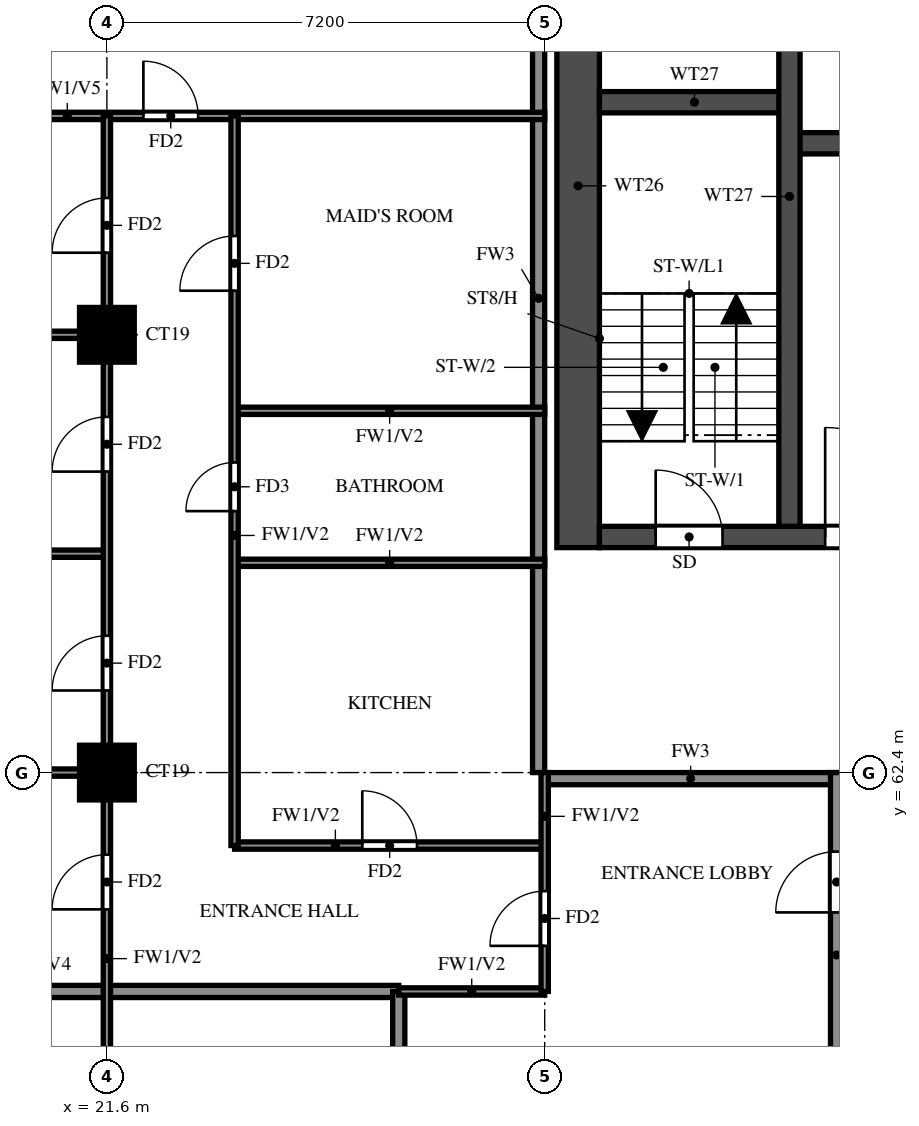
"""IFC4 building model, lengths in metres.
Left out: names, types, materials, properties, quantities, classifications, styles, units other than length and angle.
Written with IfcOpenShell. Run it as: python <this file> out.ifc"""

import sys

from ifc_helpers import new_model, si_unit, direction, frame, frame_2d, origin, origin_2d, place, context, subcontext, project, spatial, rectangle, extrude, source, transform, mapped, element, fill, save


model = new_model("IFC4")
c1 = context("Model", 3, precision=1e-05, world=origin(), true_north=direction((0.0, 1.0)))
c2 = subcontext(c1, "Body", "Model", "MODEL_VIEW")
j1 = project(units=[si_unit("LENGTHUNIT", "METRE"), si_unit("PLANEANGLEUNIT", "RADIAN")], contexts=[c1])
p1 = place(None, origin())
s1 = spatial("IfcSite", under=j1, at=p1, CompositionType="ELEMENT")
p2 = place(p1, origin())
s2 = spatial("IfcBuilding", under=s1, at=p2, CompositionType="ELEMENT")
p3 = place(p2, frame((0.0, 0.0, 188.5)))
s3 = spatial("IfcBuildingStorey", under=s2, at=p3, CompositionType="ELEMENT", Elevation=188.5)
m1 = source(origin(), c2, "Body", "SweptSolid", [
    extrude(rectangle(XDim=0.9, YDim=0.9, at=origin_2d()), origin(), (0.0, 0.0, 1.0), 3.2),
])
for number, where, z_axis, x_axis in (
    (1, (21.6, 62.4, 0.0), (0.0, 0.0, 1.0), (1.0, 0.0, 0.0)),
    (2, (21.6, 69.6, 0.0), (0.0, 0.0, 1.0), (1.0, 0.0, 0.0)),
):
    element("IfcColumn", number, at=place(p3, frame(where, z_axis=z_axis, x_axis=x_axis)), inside=s3, PredefinedType="COLUMN", context=c2, shape_type="MappedRepresentation", body=[
        mapped(m1, transform((0.0, 0.0, 0.0))),
    ])
p4 = place(p3, frame((29.35, 66.1, 0.0), z_axis=(0.0, 0.0, 1.0), x_axis=(0.0, 1.0, 0.0)))
e3 = element("IfcWall", 3, at=p4, inside=s3, PredefinedType="SHEAR", context=c2, shape_type="SweptSolid", body=[
    extrude(rectangle(XDim=11.9, YDim=0.7, at=frame_2d((5.95, 0.0))), origin(), (0.0, 0.0, 1.0), 3.2),
])
p5 = place(p3, frame((29.7, 66.275, 0.0), z_axis=(0.0, 0.0, 1.0), x_axis=(1.0, 0.0, 0.0)))
e4 = element("IfcWall", 4, at=p5, inside=s3, PredefinedType="SHEAR", context=c2, shape_type="SweptSolid", body=[
    extrude(rectangle(XDim=41.4, YDim=0.35, at=frame_2d((20.7, 0.0))), origin(), (0.0, 0.0, 1.0), 3.2),
])
p6 = place(p5, frame((0.925, 0.0, 0.0)))
e5 = element("IfcOpeningElement", 5, at=p6, cuts=e4, PredefinedType="OPENING", context=c2, shape_type="SweptSolid", body=[
    extrude(rectangle(XDim=1.1, YDim=2.1, at=frame_2d((0.55, 1.05))), frame((0.0, 0.185, 0.0), z_axis=(0.0, -1.0, 0.0), x_axis=(1.0, 0.0, 0.0)), (0.0, 0.0, 1.0), 0.37),
])
p7 = place(p5, frame((3.712, 0.0, 0.0)))
e6 = element("IfcOpeningElement", 6, at=p7, cuts=e4, PredefinedType="OPENING", context=c2, shape_type="SweptSolid", body=[
    extrude(rectangle(XDim=1.8, YDim=2.1, at=frame_2d((0.9, 1.05))), frame((0.0, 0.185, 0.0), z_axis=(0.0, -1.0, 0.0), x_axis=(1.0, 0.0, 0.0)), (0.0, 0.0, 1.0), 0.37),
])
p8 = place(p3, frame((32.825, 72.75, 0.0), z_axis=(0.0, 0.0, 1.0), x_axis=(1.0, 0.0, 0.0)))
e7 = element("IfcWall", 7, at=p8, inside=s3, PredefinedType="SHEAR", context=c2, shape_type="SweptSolid", body=[
    extrude(rectangle(XDim=35.15, YDim=0.35, at=frame_2d((17.575, 0.0))), origin(), (0.0, 0.0, 1.0), 3.2),
])
p9 = place(p8, frame((19.8, 0.0, 0.0)))
e8 = element("IfcOpeningElement", 8, at=p9, cuts=e7, PredefinedType="OPENING", context=c2, shape_type="SweptSolid", body=[
    extrude(rectangle(XDim=1.1, YDim=2.1, at=frame_2d((0.55, 1.05))), frame((0.0, 0.185, 0.0), z_axis=(0.0, -1.0, 0.0), x_axis=(1.0, 0.0, 0.0)), (0.0, 0.0, 1.0), 0.37),
])
p10 = place(p8, frame((27.7, 0.0, 0.0)))
e9 = element("IfcOpeningElement", 9, at=p10, cuts=e7, PredefinedType="OPENING", context=c2, shape_type="SweptSolid", body=[
    extrude(rectangle(XDim=1.1, YDim=2.1, at=frame_2d((0.55, 1.05))), frame((0.0, 0.185, 0.0), z_axis=(0.0, -1.0, 0.0), x_axis=(1.0, 0.0, 0.0)), (0.0, 0.0, 1.0), 0.37),
])
p11 = place(p8, frame((30.3, 0.0, 0.0)))
e10 = element("IfcOpeningElement", 10, at=p11, cuts=e7, PredefinedType="OPENING", context=c2, shape_type="SweptSolid", body=[
    extrude(rectangle(XDim=1.1, YDim=2.1, at=frame_2d((0.55, 1.05))), frame((0.0, 0.185, 0.0), z_axis=(0.0, -1.0, 0.0), x_axis=(1.0, 0.0, 0.0)), (0.0, 0.0, 1.0), 0.37),
])
p12 = place(p8, frame((3.8, 0.0, 0.0)))
e11 = element("IfcOpeningElement", 11, at=p12, cuts=e7, PredefinedType="OPENING", context=c2, shape_type="SweptSolid", body=[
    extrude(rectangle(XDim=1.1, YDim=2.1, at=frame_2d((0.55, 1.05))), frame((0.0, 0.185, 0.0), z_axis=(0.0, -1.0, 0.0), x_axis=(1.0, 0.0, 0.0)), (0.0, 0.0, 1.0), 0.37),
])
p13 = place(p8, frame((6.55, 0.0, 0.0)))
e12 = element("IfcOpeningElement", 12, at=p13, cuts=e7, PredefinedType="OPENING", context=c2, shape_type="SweptSolid", body=[
    extrude(rectangle(XDim=1.1, YDim=2.1, at=frame_2d((0.55, 1.05))), frame((0.0, 0.185, 0.0), z_axis=(0.0, -1.0, 0.0), x_axis=(1.0, 0.0, 0.0)), (0.0, 0.0, 1.0), 0.37),
])
p14 = place(p8, frame((9.3, 0.0, 0.0)))
e13 = element("IfcOpeningElement", 13, at=p14, cuts=e7, PredefinedType="OPENING", context=c2, shape_type="SweptSolid", body=[
    extrude(rectangle(XDim=1.1, YDim=2.1, at=frame_2d((0.55, 1.05))), frame((0.0, 0.185, 0.0), z_axis=(0.0, -1.0, 0.0), x_axis=(1.0, 0.0, 0.0)), (0.0, 0.0, 1.0), 0.37),
])
p15 = place(p8, frame((12.05, 0.0, 0.0)))
e14 = element("IfcOpeningElement", 14, at=p15, cuts=e7, PredefinedType="OPENING", context=c2, shape_type="SweptSolid", body=[
    extrude(rectangle(XDim=1.1, YDim=2.1, at=frame_2d((0.55, 1.05))), frame((0.0, 0.185, 0.0), z_axis=(0.0, -1.0, 0.0), x_axis=(1.0, 0.0, 0.0)), (0.0, 0.0, 1.0), 0.37),
])
p16 = place(p8, frame((14.8, 0.0, 0.0)))
e15 = element("IfcOpeningElement", 15, at=p16, cuts=e7, PredefinedType="OPENING", context=c2, shape_type="SweptSolid", body=[
    extrude(rectangle(XDim=1.1, YDim=2.1, at=frame_2d((0.55, 1.05))), frame((0.0, 0.185, 0.0), z_axis=(0.0, -1.0, 0.0), x_axis=(1.0, 0.0, 0.0)), (0.0, 0.0, 1.0), 0.37),
])
p17 = place(p8, frame((17.55, 0.0, 0.0)))
e16 = element("IfcOpeningElement", 16, at=p17, cuts=e7, PredefinedType="OPENING", context=c2, shape_type="SweptSolid", body=[
    extrude(rectangle(XDim=1.1, YDim=2.1, at=frame_2d((0.55, 1.05))), frame((0.0, 0.185, 0.0), z_axis=(0.0, -1.0, 0.0), x_axis=(1.0, 0.0, 0.0)), (0.0, 0.0, 1.0), 0.37),
])
p18 = place(p8, frame((0.938, 0.0, 0.0)))
e17 = element("IfcOpeningElement", 17, at=p18, cuts=e7, PredefinedType="OPENING", context=c2, shape_type="SweptSolid", body=[
    extrude(rectangle(XDim=1.1, YDim=2.1, at=frame_2d((0.55, 1.05))), frame((0.0, 0.185, 0.0), z_axis=(0.0, -1.0, 0.0), x_axis=(1.0, 0.0, 0.0)), (0.0, 0.0, 1.0), 0.37),
])
p19 = place(p3, frame((29.7, 73.425, 0.0), z_axis=(0.0, 0.0, 1.0), x_axis=(1.0, 0.0, 0.0)))
e18 = element("IfcWall", 18, at=p19, inside=s3, PredefinedType="SHEAR", context=c2, shape_type="SweptSolid", body=[
    extrude(rectangle(XDim=3.125, YDim=0.35, at=frame_2d((1.562, 0.0))), origin(), (0.0, 0.0, 1.0), 3.2),
])
p20 = place(p3, frame((32.825, 66.45, 0.0), z_axis=(0.0, 0.0, 1.0), x_axis=(0.0, 1.0, 0.0)))
e19 = element("IfcWall", 19, at=p20, inside=s3, PredefinedType="SHEAR", context=c2, shape_type="SweptSolid", body=[
    extrude(rectangle(XDim=10.85, YDim=0.35, at=frame_2d((5.425, 0.0))), origin(), (0.0, 0.0, 1.0), 3.2),
])
p21 = place(p3, frame((28.8, 62.3, 0.0), z_axis=(0.0, 0.0, 1.0), x_axis=(1.0, 0.0, 0.0)))
e20 = element("IfcWall", 20, at=p21, inside=s3, PredefinedType="SOLIDWALL", context=c2, shape_type="SweptSolid", body=[
    extrude(rectangle(XDim=4.8, YDim=0.2, at=frame_2d((2.4, 0.0))), origin(), (0.0, 0.0, 1.0), 3.2),
])
p22 = place(p3, frame((28.7, 62.4, 0.0), z_axis=(0.0, 0.0, 1.0), x_axis=(0.0, 1.0, 0.0)))
e21 = element("IfcWall", 21, at=p22, inside=s3, PredefinedType="SOLIDWALL", context=c2, shape_type="SweptSolid", body=[
    extrude(rectangle(XDim=15.6, YDim=0.2, at=frame_2d((7.8, 0.0))), origin(), (0.0, 0.0, 1.0), 3.2),
])
p23 = place(p3, frame((33.6, 56.4, 0.0), z_axis=(0.0, 0.0, 1.0), x_axis=(0.0, 1.0, 0.0)))
e22 = element("IfcWall", 22, at=p23, inside=s3, PredefinedType="SOLIDWALL", context=c2, shape_type="SweptSolid", body=[
    extrude(rectangle(XDim=6.0, YDim=0.2, at=frame_2d((3.0, 0.0))), origin(), (0.0, 0.0, 1.0), 3.2),
])
p24 = place(p23, frame((3.7, 0.0, 0.0)))
e23 = element("IfcOpeningElement", 23, at=p24, cuts=e22, PredefinedType="OPENING", context=c2, shape_type="SweptSolid", body=[
    extrude(rectangle(XDim=1.0, YDim=2.1, at=frame_2d((0.5, 1.05))), frame((0.0, 0.11, 0.0), z_axis=(0.0, -1.0, 0.0), x_axis=(1.0, 0.0, 0.0)), (0.0, 0.0, 1.0), 0.22),
])
p25 = place(p3, frame((14.525, 58.8, 0.0), z_axis=(0.0, 0.0, 1.0), x_axis=(1.0, 0.0, 0.0)))
e24 = element("IfcWall", 24, at=p25, inside=s3, PredefinedType="SOLIDWALL", context=c2, shape_type="SweptSolid", body=[
    extrude(rectangle(XDim=11.875, YDim=0.2, at=frame_2d((5.938, 0.0))), origin(), (0.0, 0.0, 1.0), 2.3),
])
p26 = place(p3, frame((26.4, 56.4, 0.0), z_axis=(0.0, 0.0, 1.0), x_axis=(0.0, 1.0, 0.0)))
e25 = element("IfcWall", 25, at=p26, inside=s3, PredefinedType="SOLIDWALL", context=c2, shape_type="SweptSolid", body=[
    extrude(rectangle(XDim=2.4, YDim=0.2, at=frame_2d((1.2, 0.0))), origin(), (0.0, 0.0, 1.0), 3.2),
])
p27 = place(p3, frame((26.4, 58.8, 0.0), z_axis=(0.0, 0.0, 1.0), x_axis=(1.0, 0.0, 0.0)))
e26 = element("IfcWall", 26, at=p27, inside=s3, PredefinedType="PARTITIONING", context=c2, shape_type="SweptSolid", body=[
    extrude(rectangle(XDim=2.4, YDim=0.12, at=frame_2d((1.2, 0.0))), origin(), (0.0, 0.0, 1.0), 3.2),
])
p28 = place(p3, frame((23.7, 61.2, 0.0), z_axis=(0.0, 0.0, 1.0), x_axis=(1.0, 0.0, 0.0)))
e27 = element("IfcWall", 27, at=p28, inside=s3, PredefinedType="PARTITIONING", context=c2, shape_type="SweptSolid", body=[
    extrude(rectangle(XDim=5.1, YDim=0.12, at=frame_2d((2.55, 0.0))), origin(), (0.0, 0.0, 1.0), 3.2),
])
p29 = place(p28, frame((2.1, 0.0, 0.0)))
e28 = element("IfcOpeningElement", 28, at=p29, cuts=e27, PredefinedType="OPENING", context=c2, shape_type="SweptSolid", body=[
    extrude(rectangle(XDim=0.9, YDim=2.1, at=frame_2d((0.45, 1.05))), frame((0.0, 0.07, 0.0), z_axis=(0.0, -1.0, 0.0), x_axis=(1.0, 0.0, 0.0)), (0.0, 0.0, 1.0), 0.14),
])
p30 = place(p3, frame((14.525, 62.4, 0.0), z_axis=(0.0, 0.0, 1.0), x_axis=(1.0, 0.0, 0.0)))
e29 = element("IfcWall", 29, at=p30, inside=s3, PredefinedType="PARTITIONING", context=c2, shape_type="SweptSolid", body=[
    extrude(rectangle(XDim=7.075, YDim=0.12, at=frame_2d((3.538, 0.0))), origin(), (0.0, 0.0, 1.0), 3.2),
])
p31 = place(p3, frame((23.7, 65.85, 0.0), z_axis=(0.0, 0.0, 1.0), x_axis=(1.0, 0.0, 0.0)))
e30 = element("IfcWall", 30, at=p31, inside=s3, PredefinedType="PARTITIONING", context=c2, shape_type="SweptSolid", body=[
    extrude(rectangle(XDim=5.1, YDim=0.12, at=frame_2d((2.55, 0.0))), origin(), (0.0, 0.0, 1.0), 3.2),
])
p32 = place(p3, frame((14.525, 66.0, 0.0), z_axis=(0.0, 0.0, 1.0), x_axis=(1.0, 0.0, 0.0)))
e31 = element("IfcWall", 31, at=p32, inside=s3, PredefinedType="PARTITIONING", context=c2, shape_type="SweptSolid", body=[
    extrude(rectangle(XDim=7.075, YDim=0.12, at=frame_2d((3.538, 0.0))), origin(), (0.0, 0.0, 1.0), 2.3),
])
p33 = place(p3, frame((23.7, 68.35, 0.0), z_axis=(0.0, 0.0, 1.0), x_axis=(1.0, 0.0, 0.0)))
e32 = element("IfcWall", 32, at=p33, inside=s3, PredefinedType="PARTITIONING", context=c2, shape_type="SweptSolid", body=[
    extrude(rectangle(XDim=5.1, YDim=0.12, at=frame_2d((2.55, 0.0))), origin(), (0.0, 0.0, 1.0), 3.2),
])
p34 = place(p3, frame((14.525, 69.6, 0.0), z_axis=(0.0, 0.0, 1.0), x_axis=(1.0, 0.0, 0.0)))
e33 = element("IfcWall", 33, at=p34, inside=s3, PredefinedType="PARTITIONING", context=c2, shape_type="SweptSolid", body=[
    extrude(rectangle(XDim=7.075, YDim=0.12, at=frame_2d((3.538, 0.0))), origin(), (0.0, 0.0, 1.0), 3.2),
])
p35 = place(p3, frame((14.525, 73.2, 0.0), z_axis=(0.0, 0.0, 1.0), x_axis=(1.0, 0.0, 0.0)))
e34 = element("IfcWall", 34, at=p35, inside=s3, PredefinedType="PARTITIONING", context=c2, shape_type="SweptSolid", body=[
    extrude(rectangle(XDim=14.275, YDim=0.12, at=frame_2d((7.138, 0.0))), origin(), (0.0, 0.0, 1.0), 2.3),
])
p36 = place(p35, frame((7.675, 0.0, 0.0)))
e35 = element("IfcOpeningElement", 35, at=p36, cuts=e34, PredefinedType="OPENING", context=c2, shape_type="SweptSolid", body=[
    extrude(rectangle(XDim=0.9, YDim=2.1, at=frame_2d((0.45, 1.05))), frame((0.0, 0.07, 0.0), z_axis=(0.0, -1.0, 0.0), x_axis=(1.0, 0.0, 0.0)), (0.0, 0.0, 1.0), 0.14),
])
p37 = place(p3, frame((21.6, 48.0, 0.0), z_axis=(0.0, 0.0, 1.0), x_axis=(0.0, 1.0, 0.0)))
e36 = element("IfcWall", 36, at=p37, inside=s3, PredefinedType="PARTITIONING", context=c2, shape_type="SweptSolid", body=[
    extrude(rectangle(XDim=25.2, YDim=0.12, at=frame_2d((12.6, 0.0))), origin(), (0.0, 0.0, 1.0), 3.2),
])
p38 = place(p37, frame((1.35, 0.0, 0.0)))
e37 = element("IfcOpeningElement", 37, at=p38, cuts=e36, PredefinedType="OPENING", context=c2, shape_type="SweptSolid", body=[
    extrude(rectangle(XDim=0.9, YDim=2.1, at=frame_2d((0.45, 1.05))), frame((0.0, 0.07, 0.0), z_axis=(0.0, -1.0, 0.0), x_axis=(1.0, 0.0, 0.0)), (0.0, 0.0, 1.0), 0.14),
])
p39 = place(p37, frame((4.95, 0.0, 0.0)))
e38 = element("IfcOpeningElement", 38, at=p39, cuts=e36, PredefinedType="OPENING", context=c2, shape_type="SweptSolid", body=[
    extrude(rectangle(XDim=0.9, YDim=2.1, at=frame_2d((0.45, 1.05))), frame((0.0, 0.07, 0.0), z_axis=(0.0, -1.0, 0.0), x_axis=(1.0, 0.0, 0.0)), (0.0, 0.0, 1.0), 0.14),
])
p40 = place(p37, frame((8.25, 0.0, 0.0)))
e39 = element("IfcOpeningElement", 39, at=p40, cuts=e36, PredefinedType="OPENING", context=c2, shape_type="SweptSolid", body=[
    extrude(rectangle(XDim=1.5, YDim=2.1, at=frame_2d((0.75, 1.05))), frame((0.0, 0.07, 0.0), z_axis=(0.0, -1.0, 0.0), x_axis=(1.0, 0.0, 0.0)), (0.0, 0.0, 1.0), 0.14),
])
p41 = place(p37, frame((12.15, 0.0, 0.0)))
e40 = element("IfcOpeningElement", 40, at=p41, cuts=e36, PredefinedType="OPENING", context=c2, shape_type="SweptSolid", body=[
    extrude(rectangle(XDim=0.9, YDim=2.1, at=frame_2d((0.45, 1.05))), frame((0.0, 0.07, 0.0), z_axis=(0.0, -1.0, 0.0), x_axis=(1.0, 0.0, 0.0)), (0.0, 0.0, 1.0), 0.14),
])
p42 = place(p37, frame((15.75, 0.0, 0.0)))
e41 = element("IfcOpeningElement", 41, at=p42, cuts=e36, PredefinedType="OPENING", context=c2, shape_type="SweptSolid", body=[
    extrude(rectangle(XDim=0.9, YDim=2.1, at=frame_2d((0.45, 1.05))), frame((0.0, 0.07, 0.0), z_axis=(0.0, -1.0, 0.0), x_axis=(1.0, 0.0, 0.0)), (0.0, 0.0, 1.0), 0.14),
])
p43 = place(p37, frame((19.35, 0.0, 0.0)))
e42 = element("IfcOpeningElement", 42, at=p43, cuts=e36, PredefinedType="OPENING", context=c2, shape_type="SweptSolid", body=[
    extrude(rectangle(XDim=0.9, YDim=2.1, at=frame_2d((0.45, 1.05))), frame((0.0, 0.07, 0.0), z_axis=(0.0, -1.0, 0.0), x_axis=(1.0, 0.0, 0.0)), (0.0, 0.0, 1.0), 0.14),
])
p44 = place(p37, frame((22.95, 0.0, 0.0)))
e43 = element("IfcOpeningElement", 43, at=p44, cuts=e36, PredefinedType="OPENING", context=c2, shape_type="SweptSolid", body=[
    extrude(rectangle(XDim=0.9, YDim=2.1, at=frame_2d((0.45, 1.05))), frame((0.0, 0.07, 0.0), z_axis=(0.0, -1.0, 0.0), x_axis=(1.0, 0.0, 0.0)), (0.0, 0.0, 1.0), 0.14),
])
p45 = place(p3, frame((23.7, 61.2, 0.0), z_axis=(0.0, 0.0, 1.0), x_axis=(0.0, 1.0, 0.0)))
e44 = element("IfcWall", 44, at=p45, inside=s3, PredefinedType="PARTITIONING", context=c2, shape_type="SweptSolid", body=[
    extrude(rectangle(XDim=12.0, YDim=0.12, at=frame_2d((6.0, 0.0))), origin(), (0.0, 0.0, 1.0), 3.2),
])
p46 = place(p45, frame((5.5, 0.0, 0.0)))
e45 = element("IfcOpeningElement", 45, at=p46, cuts=e44, PredefinedType="OPENING", context=c2, shape_type="SweptSolid", body=[
    extrude(rectangle(XDim=0.8, YDim=2.1, at=frame_2d((0.4, 1.05))), frame((0.0, 0.07, 0.0), z_axis=(0.0, -1.0, 0.0), x_axis=(1.0, 0.0, 0.0)), (0.0, 0.0, 1.0), 0.14),
])
p47 = place(p45, frame((9.125, 0.0, 0.0)))
e46 = element("IfcOpeningElement", 46, at=p47, cuts=e44, PredefinedType="OPENING", context=c2, shape_type="SweptSolid", body=[
    extrude(rectangle(XDim=0.9, YDim=2.1, at=frame_2d((0.45, 1.05))), frame((0.0, 0.07, 0.0), z_axis=(0.0, -1.0, 0.0), x_axis=(1.0, 0.0, 0.0)), (0.0, 0.0, 1.0), 0.14),
])
p48 = place(p3, frame((28.8, 58.8, 0.0), z_axis=(0.0, 0.0, 1.0), x_axis=(0.0, 1.0, 0.0)))
e47 = element("IfcWall", 47, at=p48, inside=s3, PredefinedType="PARTITIONING", context=c2, shape_type="SweptSolid", body=[
    extrude(rectangle(XDim=3.6, YDim=0.12, at=frame_2d((1.8, 0.0))), origin(), (0.0, 0.0, 1.0), 3.2),
])
p49 = place(p48, frame((0.75, 0.0, 0.0)))
e48 = element("IfcOpeningElement", 48, at=p49, cuts=e47, PredefinedType="OPENING", context=c2, shape_type="SweptSolid", body=[
    extrude(rectangle(XDim=0.9, YDim=2.1, at=frame_2d((0.45, 1.05))), frame((0.0, 0.07, 0.0), z_axis=(0.0, -1.0, 0.0), x_axis=(1.0, 0.0, 0.0)), (0.0, 0.0, 1.0), 0.14),
])
p50 = place(p6, origin())
e49 = element("IfcDoor", 49, at=p50, inside=s3, OperationType="SINGLE_SWING_LEFT", PredefinedType="DOOR", context=c2, shape_type="SweptSolid", body=[
    extrude(rectangle(XDim=1.1, YDim=2.1, at=frame_2d((0.55, 1.05))), frame((0.0, 0.025, 0.0), z_axis=(0.0, -1.0, 0.0), x_axis=(1.0, 0.0, 0.0)), (0.0, 0.0, 1.0), 0.05),
])
fill(e5, e49)
p51 = place(p7, origin())
e50 = element("IfcDoor", 50, at=p51, inside=s3, OperationType="DOUBLE_DOOR_SINGLE_SWING", PredefinedType="DOOR", context=c2, shape_type="SweptSolid", body=[
    extrude(rectangle(XDim=1.8, YDim=2.1, at=frame_2d((0.9, 1.05))), frame((0.0, 0.025, 0.0), z_axis=(0.0, -1.0, 0.0), x_axis=(1.0, 0.0, 0.0)), (0.0, 0.0, 1.0), 0.05),
])
fill(e6, e50)
p52 = place(p49, origin())
e51 = element("IfcDoor", 51, at=p52, inside=s3, OperationType="SINGLE_SWING_LEFT", PredefinedType="DOOR", context=c2, shape_type="SweptSolid", body=[
    extrude(rectangle(XDim=0.9, YDim=2.1, at=frame_2d((0.45, 1.05))), frame((0.0, 0.025, 0.0), z_axis=(0.0, -1.0, 0.0), x_axis=(1.0, 0.0, 0.0)), (0.0, 0.0, 1.0), 0.05),
])
fill(e48, e51)
p53 = place(p24, origin())
e52 = element("IfcDoor", 52, at=p53, inside=s3, OperationType="SINGLE_SWING_LEFT", PredefinedType="DOOR", context=c2, shape_type="SweptSolid", body=[
    extrude(rectangle(XDim=1.0, YDim=2.1, at=frame_2d((0.5, 1.05))), frame((0.0, 0.025, 0.0), z_axis=(0.0, -1.0, 0.0), x_axis=(1.0, 0.0, 0.0)), (0.0, 0.0, 1.0), 0.05),
])
fill(e23, e52)
p54 = place(p41, origin())
e53 = element("IfcDoor", 53, at=p54, inside=s3, OperationType="SINGLE_SWING_RIGHT", PredefinedType="DOOR", context=c2, shape_type="SweptSolid", body=[
    extrude(rectangle(XDim=0.9, YDim=2.1, at=frame_2d((0.45, 1.05))), frame((0.0, 0.025, 0.0), z_axis=(0.0, -1.0, 0.0), x_axis=(1.0, 0.0, 0.0)), (0.0, 0.0, 1.0), 0.05),
])
fill(e40, e53)
p55 = place(p42, origin())
e54 = element("IfcDoor", 54, at=p55, inside=s3, OperationType="SINGLE_SWING_LEFT", PredefinedType="DOOR", context=c2, shape_type="SweptSolid", body=[
    extrude(rectangle(XDim=0.9, YDim=2.1, at=frame_2d((0.45, 1.05))), frame((0.0, 0.025, 0.0), z_axis=(0.0, -1.0, 0.0), x_axis=(1.0, 0.0, 0.0)), (0.0, 0.0, 1.0), 0.05),
])
fill(e41, e54)
p56 = place(p43, origin())
e55 = element("IfcDoor", 55, at=p56, inside=s3, OperationType="SINGLE_SWING_LEFT", PredefinedType="DOOR", context=c2, shape_type="SweptSolid", body=[
    extrude(rectangle(XDim=0.9, YDim=2.1, at=frame_2d((0.45, 1.05))), frame((0.0, 0.025, 0.0), z_axis=(0.0, -1.0, 0.0), x_axis=(1.0, 0.0, 0.0)), (0.0, 0.0, 1.0), 0.05),
])
fill(e42, e55)
p57 = place(p44, origin())
e56 = element("IfcDoor", 56, at=p57, inside=s3, OperationType="SINGLE_SWING_RIGHT", PredefinedType="DOOR", context=c2, shape_type="SweptSolid", body=[
    extrude(rectangle(XDim=0.9, YDim=2.1, at=frame_2d((0.45, 1.05))), frame((0.0, 0.025, 0.0), z_axis=(0.0, -1.0, 0.0), x_axis=(1.0, 0.0, 0.0)), (0.0, 0.0, 1.0), 0.05),
])
fill(e43, e56)
p58 = place(p36, origin())
e57 = element("IfcDoor", 57, at=p58, inside=s3, OperationType="SINGLE_SWING_LEFT", PredefinedType="DOOR", context=c2, shape_type="SweptSolid", body=[
    extrude(rectangle(XDim=0.9, YDim=2.1, at=frame_2d((0.45, 1.05))), frame((0.0, 0.025, 0.0), z_axis=(0.0, -1.0, 0.0), x_axis=(1.0, 0.0, 0.0)), (0.0, 0.0, 1.0), 0.05),
])
fill(e35, e57)
p59 = place(p29, origin())
e58 = element("IfcDoor", 58, at=p59, inside=s3, OperationType="SINGLE_SWING_LEFT", PredefinedType="DOOR", context=c2, shape_type="SweptSolid", body=[
    extrude(rectangle(XDim=0.9, YDim=2.1, at=frame_2d((0.45, 1.05))), frame((0.0, 0.025, 0.0), z_axis=(0.0, -1.0, 0.0), x_axis=(1.0, 0.0, 0.0)), (0.0, 0.0, 1.0), 0.05),
])
fill(e28, e58)
p60 = place(p46, origin())
e59 = element("IfcDoor", 59, at=p60, inside=s3, OperationType="SINGLE_SWING_RIGHT", PredefinedType="DOOR", context=c2, shape_type="SweptSolid", body=[
    extrude(rectangle(XDim=0.8, YDim=2.1, at=frame_2d((0.4, 1.05))), frame((0.0, 0.025, 0.0), z_axis=(0.0, -1.0, 0.0), x_axis=(1.0, 0.0, 0.0)), (0.0, 0.0, 1.0), 0.05),
])
fill(e45, e59)
p61 = place(p47, origin())
e60 = element("IfcDoor", 60, at=p61, inside=s3, OperationType="SINGLE_SWING_LEFT", PredefinedType="DOOR", context=c2, shape_type="SweptSolid", body=[
    extrude(rectangle(XDim=0.9, YDim=2.1, at=frame_2d((0.45, 1.05))), frame((0.0, 0.025, 0.0), z_axis=(0.0, -1.0, 0.0), x_axis=(1.0, 0.0, 0.0)), (0.0, 0.0, 1.0), 0.05),
])
fill(e46, e60)
save(model, sys.argv[1])
